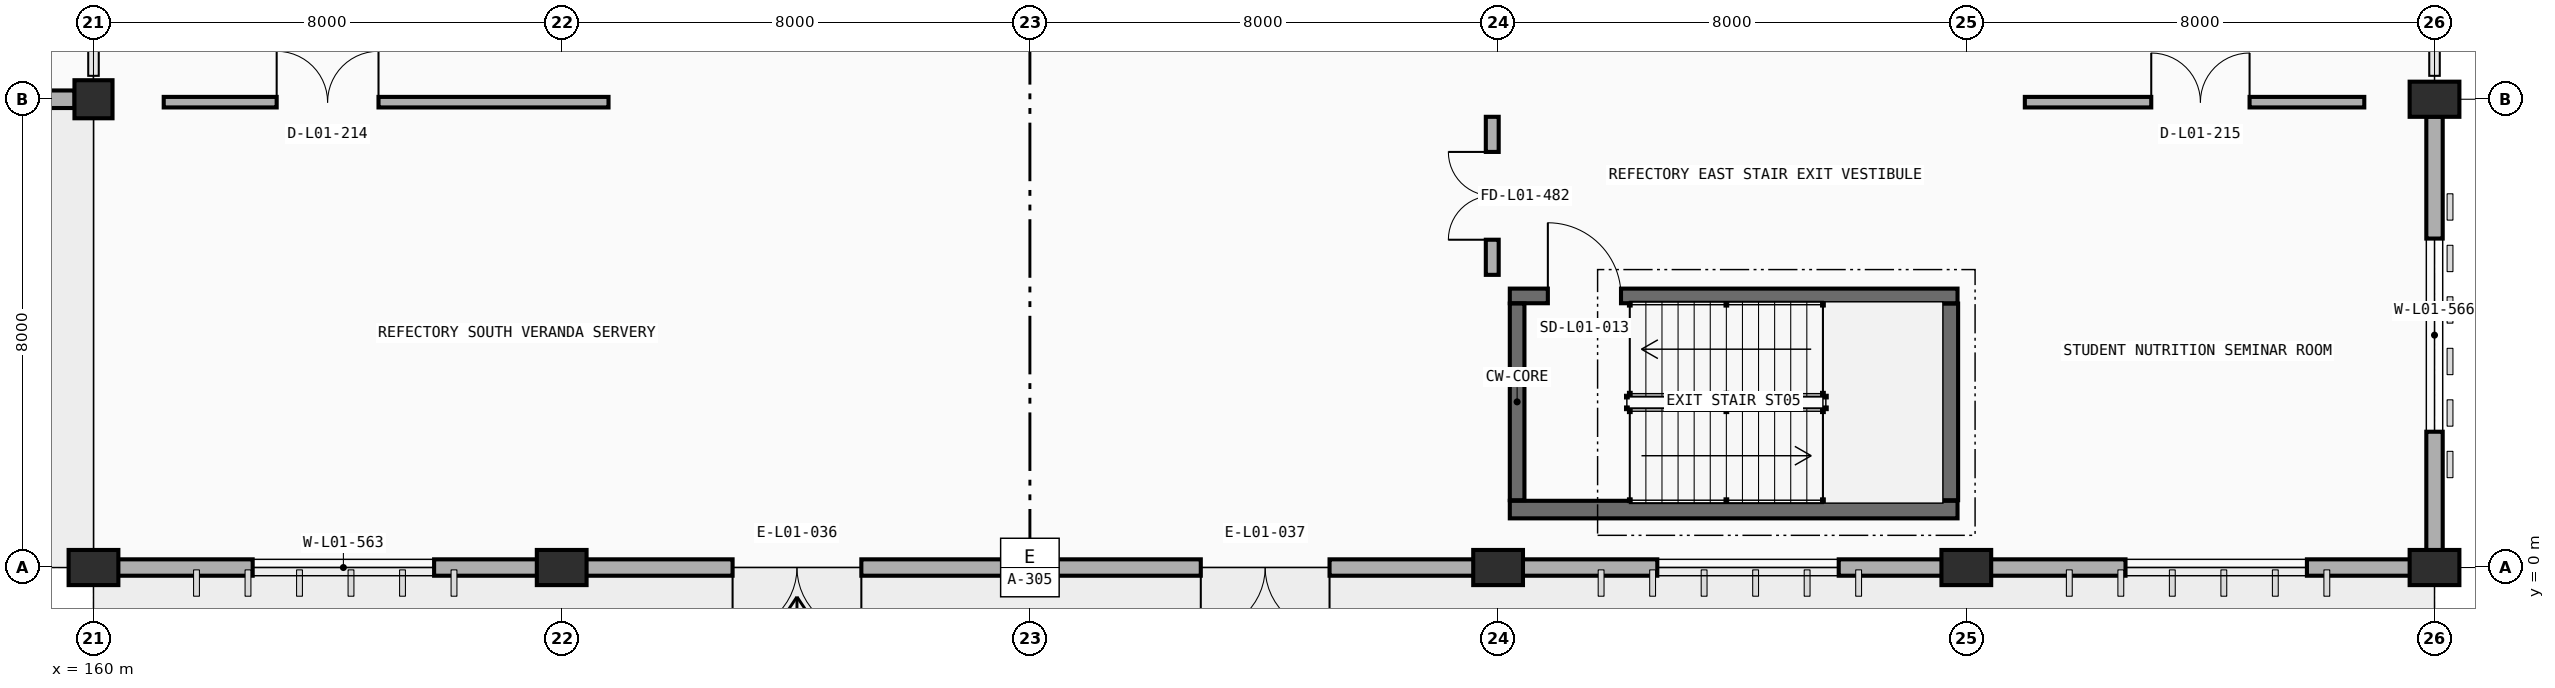
"""IFC4 building model, lengths in metres.
Left out: names, types, materials, properties, quantities, classifications, styles, units other than length and angle.
Written with IfcOpenShell. Run it as: python <this file> out.ifc"""

import sys

from ifc_helpers import new_model, si_unit, direction, frame, frame_2d, origin, origin_2d, place, context, subcontext, project, spatial, rectangle, extrude, element, fill, save


model = new_model("IFC4")
c1 = context("Model", 3, precision=1e-05, world=origin(), true_north=direction((0.0, 1.0)))
c2 = subcontext(c1, "Body", "Model", "MODEL_VIEW")
j1 = project(units=[si_unit("LENGTHUNIT", "METRE"), si_unit("PLANEANGLEUNIT", "RADIAN")], contexts=[c1])
p1 = place(None, origin())
s1 = spatial("IfcSite", under=j1, at=p1, CompositionType="ELEMENT")
p2 = place(p1, origin())
s2 = spatial("IfcBuilding", under=s1, at=p2, CompositionType="ELEMENT")
p3 = place(p2, origin())
s3 = spatial("IfcBuildingStorey", under=s2, at=p3, CompositionType="ELEMENT", Elevation=0.0)
for number, where, z_axis, x_axis in (
    (1, (160.0, 0.0, 0.0), (0.0, 0.0, 1.0), (0.0, 1.0, 0.0)),
    (2, (168.0, 0.0, 0.0), (0.0, 0.0, 1.0), (0.0, 1.0, 0.0)),
    (3, (176.0, 0.0, 0.0), (0.0, 0.0, 1.0), (0.0, 1.0, 0.0)),
    (4, (184.0, 0.0, 0.0), (0.0, 0.0, 1.0), (0.0, 1.0, 0.0)),
    (5, (192.0, 0.0, 0.0), (0.0, 0.0, 1.0), (0.0, 1.0, 0.0)),
    (6, (200.0, 0.0, 0.0), (0.0, 0.0, 1.0), (0.0, 1.0, 0.0)),
):
    element("IfcColumn", number, at=place(p3, frame(where, z_axis=z_axis, x_axis=x_axis)), inside=s3, PredefinedType="COLUMN", context=c2, shape_type="SweptSolid", body=[
        extrude(rectangle(XDim=0.6, YDim=0.85, at=origin_2d()), origin(), (0.0, 0.0, 1.0), 4.8),
    ])
p4 = place(p3, frame((160.0, 8.0, 0.0), z_axis=(0.0, 0.0, 1.0), x_axis=(1.0, 0.0, 0.0)))
e7 = element("IfcColumn", 7, at=p4, inside=s3, PredefinedType="COLUMN", context=c2, shape_type="SweptSolid", body=[
    extrude(rectangle(XDim=0.65, YDim=0.65, at=origin_2d()), origin(), (0.0, 0.0, 1.0), 4.8),
])
p5 = place(p3, frame((200.0, 8.0, 0.0), z_axis=(0.0, 0.0, 1.0), x_axis=(0.0, 1.0, 0.0)))
e8 = element("IfcColumn", 8, at=p5, inside=s3, PredefinedType="COLUMN", context=c2, shape_type="SweptSolid", body=[
    extrude(rectangle(XDim=0.6, YDim=0.85, at=origin_2d()), origin(), (0.0, 0.0, 1.0), 4.8),
])
p6 = place(p3, frame((159.678, 8.0, 0.0), z_axis=(0.0, 0.0, 1.0), x_axis=(-1.0, 0.0, 0.0)))
e9 = element("IfcWall", 9, at=p6, inside=s3, PredefinedType="STANDARD", context=c2, shape_type="SweptSolid", body=[
    extrude(rectangle(XDim=7.331, YDim=0.3, at=frame_2d((3.666, 0.0))), origin(), (0.0, 0.0, 1.0), 3.91),
])
p7 = place(p6, frame((2.258, 0.0, 0.9)))
e10 = element("IfcOpeningElement", 10, at=p7, cuts=e9, PredefinedType="OPENING", context=c2, shape_type="SweptSolid", body=[
    extrude(rectangle(XDim=1.45, YDim=1.25, at=frame_2d((0.725, 0.625))), frame((0.0, 0.16, 0.0), z_axis=(0.0, -1.0, 0.0), x_axis=(1.0, 0.0, 0.0)), (0.0, 0.0, 1.0), 0.32),
])
p8 = place(p3, frame((167.62, 0.0, 0.0), z_axis=(0.0, 0.0, 1.0), x_axis=(-1.0, 0.0, 0.0)))
e11 = element("IfcWall", 11, at=p8, inside=s3, PredefinedType="STANDARD", context=c2, shape_type="SweptSolid", body=[
    extrude(rectangle(XDim=7.24, YDim=0.28, at=frame_2d((3.62, 0.0))), origin(), (0.0, 0.0, 1.0), 3.89),
])
p9 = place(p8, frame((1.8, 0.0, 0.9)))
e12 = element("IfcOpeningElement", 12, at=p9, cuts=e11, PredefinedType="OPENING", context=c2, shape_type="SweptSolid", body=[
    extrude(rectangle(XDim=3.1, YDim=1.6, at=frame_2d((1.55, 0.8))), frame((0.0, 0.15, 0.0), z_axis=(0.0, -1.0, 0.0), x_axis=(1.0, 0.0, 0.0)), (0.0, 0.0, 1.0), 0.3),
])
p10 = place(p3, frame((175.62, 0.0, 0.0), z_axis=(0.0, 0.0, 1.0), x_axis=(-1.0, 0.0, 0.0)))
e13 = element("IfcWall", 13, at=p10, inside=s3, PredefinedType="STANDARD", context=c2, shape_type="SweptSolid", body=[
    extrude(rectangle(XDim=7.24, YDim=0.28, at=frame_2d((3.62, 0.0))), origin(), (0.0, 0.0, 1.0), 3.89),
])
p11 = place(p10, frame((2.5, 0.0, 0.0)))
e14 = element("IfcOpeningElement", 14, at=p11, cuts=e13, PredefinedType="OPENING", context=c2, shape_type="SweptSolid", body=[
    extrude(rectangle(XDim=2.2, YDim=2.4, at=frame_2d((1.1, 1.2))), frame((0.0, 0.15, 0.0), z_axis=(0.0, -1.0, 0.0), x_axis=(1.0, 0.0, 0.0)), (0.0, 0.0, 1.0), 0.3),
])
p12 = place(p3, frame((183.62, 0.0, 0.0), z_axis=(0.0, 0.0, 1.0), x_axis=(-1.0, 0.0, 0.0)))
e15 = element("IfcWall", 15, at=p12, inside=s3, PredefinedType="STANDARD", context=c2, shape_type="SweptSolid", body=[
    extrude(rectangle(XDim=7.24, YDim=0.28, at=frame_2d((3.62, 0.0))), origin(), (0.0, 0.0, 1.0), 3.89),
])
p13 = place(p12, frame((2.5, 0.0, 0.0)))
e16 = element("IfcOpeningElement", 16, at=p13, cuts=e15, PredefinedType="OPENING", context=c2, shape_type="SweptSolid", body=[
    extrude(rectangle(XDim=2.2, YDim=2.4, at=frame_2d((1.1, 1.2))), frame((0.0, 0.15, 0.0), z_axis=(0.0, -1.0, 0.0), x_axis=(1.0, 0.0, 0.0)), (0.0, 0.0, 1.0), 0.3),
])
p14 = place(p3, frame((191.62, 0.0, 0.0), z_axis=(0.0, 0.0, 1.0), x_axis=(-1.0, 0.0, 0.0)))
e17 = element("IfcWall", 17, at=p14, inside=s3, PredefinedType="STANDARD", context=c2, shape_type="SweptSolid", body=[
    extrude(rectangle(XDim=7.24, YDim=0.28, at=frame_2d((3.62, 0.0))), origin(), (0.0, 0.0, 1.0), 3.89),
])
p15 = place(p14, frame((1.8, 0.0, 0.9)))
e18 = element("IfcOpeningElement", 18, at=p15, cuts=e17, PredefinedType="OPENING", context=c2, shape_type="SweptSolid", body=[
    extrude(rectangle(XDim=3.1, YDim=1.6, at=frame_2d((1.55, 0.8))), frame((0.0, 0.15, 0.0), z_axis=(0.0, -1.0, 0.0), x_axis=(1.0, 0.0, 0.0)), (0.0, 0.0, 1.0), 0.3),
])
p16 = place(p3, frame((199.62, 0.0, 0.0), z_axis=(0.0, 0.0, 1.0), x_axis=(-1.0, 0.0, 0.0)))
e19 = element("IfcWall", 19, at=p16, inside=s3, PredefinedType="STANDARD", context=c2, shape_type="SweptSolid", body=[
    extrude(rectangle(XDim=7.24, YDim=0.28, at=frame_2d((3.62, 0.0))), origin(), (0.0, 0.0, 1.0), 3.89),
])
p17 = place(p16, frame((1.8, 0.0, 0.9)))
e20 = element("IfcOpeningElement", 20, at=p17, cuts=e19, PredefinedType="OPENING", context=c2, shape_type="SweptSolid", body=[
    extrude(rectangle(XDim=3.1, YDim=1.6, at=frame_2d((1.55, 0.8))), frame((0.0, 0.15, 0.0), z_axis=(0.0, -1.0, 0.0), x_axis=(1.0, 0.0, 0.0)), (0.0, 0.0, 1.0), 0.3),
])
p18 = place(p3, frame((200.0, 7.703, 0.0), z_axis=(0.0, 0.0, 1.0), x_axis=(0.0, -1.0, 0.0)))
e21 = element("IfcWall", 21, at=p18, inside=s3, PredefinedType="STANDARD", context=c2, shape_type="SweptSolid", body=[
    extrude(rectangle(XDim=7.406, YDim=0.28, at=frame_2d((3.703, 0.0))), origin(), (0.0, 0.0, 1.0), 3.59),
])
p19 = place(p18, frame((2.083, 0.0, 0.95)))
e22 = element("IfcOpeningElement", 22, at=p19, cuts=e21, PredefinedType="OPENING", context=c2, shape_type="SweptSolid", body=[
    extrude(rectangle(XDim=3.3, YDim=1.75, at=frame_2d((1.65, 0.875))), frame((0.0, 0.15, 0.0), z_axis=(0.0, -1.0, 0.0), x_axis=(1.0, 0.0, 0.0)), (0.0, 0.0, 1.0), 0.3),
])
p20 = place(p3, frame((184.2, 0.99, 0.0), z_axis=(0.0, 0.0, 1.0), x_axis=(1.0, 0.0, 0.0)))
e23 = element("IfcWall", 23, at=p20, inside=s3, PredefinedType="SHEAR", context=c2, shape_type="SweptSolid", body=[
    extrude(rectangle(XDim=7.65, YDim=0.3, at=frame_2d((3.825, 0.0))), origin(), (0.0, 0.0, 1.0), 4.8),
])
p21 = place(p3, frame((191.71, 1.15, 0.0), z_axis=(0.0, 0.0, 1.0), x_axis=(0.0, 1.0, 0.0)))
e24 = element("IfcWall", 24, at=p21, inside=s3, PredefinedType="SHEAR", context=c2, shape_type="SweptSolid", body=[
    extrude(rectangle(XDim=3.36, YDim=0.3, at=frame_2d((1.68, 0.0))), origin(), (0.0, 0.0, 1.0), 4.8),
])
p22 = place(p3, frame((184.2, 4.64, 0.0), z_axis=(0.0, 0.0, 1.0), x_axis=(1.0, 0.0, 0.0)))
e25 = element("IfcWall", 25, at=p22, inside=s3, PredefinedType="SOLIDWALL", context=c2, shape_type="SweptSolid", body=[
    extrude(rectangle(XDim=7.65, YDim=0.25, at=frame_2d((3.825, 0.0))), origin(), (0.0, 0.0, 1.0), 4.8),
])
p23 = place(p22, frame((0.65, 0.0, 0.0)))
e26 = element("IfcOpeningElement", 26, at=p23, cuts=e25, PredefinedType="OPENING", context=c2, shape_type="SweptSolid", body=[
    extrude(rectangle(XDim=1.25, YDim=2.15, at=frame_2d((0.625, 1.075))), frame((0.0, 0.135, 0.0), z_axis=(0.0, -1.0, 0.0), x_axis=(1.0, 0.0, 0.0)), (0.0, 0.0, 1.0), 0.27),
])
p24 = place(p3, frame((184.325, 1.15, 0.0), z_axis=(0.0, 0.0, 1.0), x_axis=(0.0, 1.0, 0.0)))
e27 = element("IfcWall", 27, at=p24, inside=s3, PredefinedType="SOLIDWALL", context=c2, shape_type="SweptSolid", body=[
    extrude(rectangle(XDim=3.36, YDim=0.25, at=frame_2d((1.68, 0.0))), origin(), (0.0, 0.0, 1.0), 4.8),
])
p25 = place(p3, frame((161.2, 7.95, 0.0), z_axis=(0.0, 0.0, 1.0), x_axis=(1.0, 0.0, 0.0)))
e28 = element("IfcWall", 28, at=p25, inside=s3, PredefinedType="PARTITIONING", context=c2, shape_type="SweptSolid", body=[
    extrude(rectangle(XDim=7.6, YDim=0.18, at=frame_2d((3.8, 0.0))), origin(), (0.0, 0.0, 1.0), 3.9),
])
p26 = place(p25, frame((1.93, 0.0, 0.0)))
e29 = element("IfcOpeningElement", 29, at=p26, cuts=e28, PredefinedType="OPENING", context=c2, shape_type="SweptSolid", body=[
    extrude(rectangle(XDim=1.74, YDim=2.22, at=frame_2d((0.87, 1.11))), frame((0.0, 0.1, 0.0), z_axis=(0.0, -1.0, 0.0), x_axis=(1.0, 0.0, 0.0)), (0.0, 0.0, 1.0), 0.2),
])
p27 = place(p3, frame((193.0, 7.95, 0.0), z_axis=(0.0, 0.0, 1.0), x_axis=(1.0, 0.0, 0.0)))
e30 = element("IfcWall", 30, at=p27, inside=s3, PredefinedType="PARTITIONING", context=c2, shape_type="SweptSolid", body=[
    extrude(rectangle(XDim=5.8, YDim=0.18, at=frame_2d((2.9, 0.0))), origin(), (0.0, 0.0, 1.0), 3.9),
])
p28 = place(p27, frame((2.16, 0.0, 0.0)))
e31 = element("IfcOpeningElement", 31, at=p28, cuts=e30, PredefinedType="OPENING", context=c2, shape_type="SweptSolid", body=[
    extrude(rectangle(XDim=1.68, YDim=2.25, at=frame_2d((0.84, 1.125))), frame((0.0, 0.1, 0.0), z_axis=(0.0, -1.0, 0.0), x_axis=(1.0, 0.0, 0.0)), (0.0, 0.0, 1.0), 0.2),
])
p29 = place(p3, frame((183.9, 5.0, 0.0), z_axis=(0.0, 0.0, 1.0), x_axis=(0.0, 1.0, 0.0)))
e32 = element("IfcWall", 32, at=p29, inside=s3, PredefinedType="PARTITIONING", context=c2, shape_type="SweptSolid", body=[
    extrude(rectangle(XDim=2.7, YDim=0.22, at=frame_2d((1.35, 0.0))), origin(), (0.0, 0.0, 1.0), 3.812),
])
p30 = place(p29, frame((0.6, 0.0, 0.0)))
e33 = element("IfcOpeningElement", 33, at=p30, cuts=e32, PredefinedType="OPENING", context=c2, shape_type="SweptSolid", body=[
    extrude(rectangle(XDim=1.5, YDim=2.2, at=frame_2d((0.75, 1.1))), frame((0.0, 0.12, 0.0), z_axis=(0.0, -1.0, 0.0), x_axis=(1.0, 0.0, 0.0)), (0.0, 0.0, 1.0), 0.24),
])
p31 = place(p9, origin())
e34 = element("IfcWindow", 34, at=p31, inside=s3, PartitioningType="DOUBLE_PANEL_VERTICAL", PredefinedType="WINDOW", context=c2, shape_type="SweptSolid", body=[
    extrude(rectangle(XDim=3.1, YDim=1.6, at=frame_2d((1.55, 0.8))), frame((0.0, 0.03, 0.0), z_axis=(0.0, -1.0, 0.0), x_axis=(1.0, 0.0, 0.0)), (0.0, 0.0, 1.0), 0.06),
])
fill(e12, e34)
p32 = place(p11, origin())
e35 = element("IfcDoor", 35, at=p32, inside=s3, OperationType="DOUBLE_DOOR_SINGLE_SWING", PredefinedType="DOOR", context=c2, shape_type="SweptSolid", body=[
    extrude(rectangle(XDim=2.2, YDim=2.4, at=frame_2d((1.1, 1.2))), frame((0.0, 0.025, 0.0), z_axis=(0.0, -1.0, 0.0), x_axis=(1.0, 0.0, 0.0)), (0.0, 0.0, 1.0), 0.05),
])
fill(e14, e35)
p33 = place(p13, origin())
e36 = element("IfcDoor", 36, at=p33, inside=s3, OperationType="DOUBLE_DOOR_SINGLE_SWING", PredefinedType="DOOR", context=c2, shape_type="SweptSolid", body=[
    extrude(rectangle(XDim=2.2, YDim=2.4, at=frame_2d((1.1, 1.2))), frame((0.0, 0.025, 0.0), z_axis=(0.0, -1.0, 0.0), x_axis=(1.0, 0.0, 0.0)), (0.0, 0.0, 1.0), 0.05),
])
fill(e16, e36)
p34 = place(p15, origin())
e37 = element("IfcWindow", 37, at=p34, inside=s3, PartitioningType="DOUBLE_PANEL_VERTICAL", PredefinedType="WINDOW", context=c2, shape_type="SweptSolid", body=[
    extrude(rectangle(XDim=3.1, YDim=1.6, at=frame_2d((1.55, 0.8))), frame((0.0, 0.03, 0.0), z_axis=(0.0, -1.0, 0.0), x_axis=(1.0, 0.0, 0.0)), (0.0, 0.0, 1.0), 0.06),
])
fill(e18, e37)
p35 = place(p17, origin())
e38 = element("IfcWindow", 38, at=p35, inside=s3, PartitioningType="DOUBLE_PANEL_VERTICAL", PredefinedType="WINDOW", context=c2, shape_type="SweptSolid", body=[
    extrude(rectangle(XDim=3.1, YDim=1.6, at=frame_2d((1.55, 0.8))), frame((0.0, 0.03, 0.0), z_axis=(0.0, -1.0, 0.0), x_axis=(1.0, 0.0, 0.0)), (0.0, 0.0, 1.0), 0.06),
])
fill(e20, e38)
p36 = place(p19, origin())
e39 = element("IfcWindow", 39, at=p36, inside=s3, PartitioningType="DOUBLE_PANEL_VERTICAL", PredefinedType="WINDOW", context=c2, shape_type="SweptSolid", body=[
    extrude(rectangle(XDim=3.3, YDim=1.75, at=frame_2d((1.65, 0.875))), frame((0.0, 0.03, 0.0), z_axis=(0.0, -1.0, 0.0), x_axis=(1.0, 0.0, 0.0)), (0.0, 0.0, 1.0), 0.06),
])
fill(e22, e39)
p37 = place(p23, origin())
e40 = element("IfcDoor", 40, at=p37, inside=s3, OperationType="SINGLE_SWING_LEFT", PredefinedType="DOOR", context=c2, shape_type="SweptSolid", body=[
    extrude(rectangle(XDim=1.25, YDim=2.15, at=frame_2d((0.625, 1.075))), frame((0.0, 0.025, 0.0), z_axis=(0.0, -1.0, 0.0), x_axis=(1.0, 0.0, 0.0)), (0.0, 0.0, 1.0), 0.05),
])
fill(e26, e40)
p38 = place(p26, origin())
e41 = element("IfcDoor", 41, at=p38, inside=s3, OperationType="DOUBLE_DOOR_SINGLE_SWING", PredefinedType="DOOR", context=c2, shape_type="SweptSolid", body=[
    extrude(rectangle(XDim=1.74, YDim=2.22, at=frame_2d((0.87, 1.11))), frame((0.0, 0.025, 0.0), z_axis=(0.0, -1.0, 0.0), x_axis=(1.0, 0.0, 0.0)), (0.0, 0.0, 1.0), 0.05),
])
fill(e29, e41)
p39 = place(p28, origin())
e42 = element("IfcDoor", 42, at=p39, inside=s3, OperationType="DOUBLE_DOOR_SINGLE_SWING", PredefinedType="DOOR", context=c2, shape_type="SweptSolid", body=[
    extrude(rectangle(XDim=1.68, YDim=2.25, at=frame_2d((0.84, 1.125))), frame((0.0, 0.025, 0.0), z_axis=(0.0, -1.0, 0.0), x_axis=(1.0, 0.0, 0.0)), (0.0, 0.0, 1.0), 0.05),
])
fill(e31, e42)
p40 = place(p30, origin())
e43 = element("IfcDoor", 43, at=p40, inside=s3, OperationType="DOUBLE_DOOR_SINGLE_SWING", PredefinedType="DOOR", context=c2, shape_type="SweptSolid", body=[
    extrude(rectangle(XDim=1.5, YDim=2.2, at=frame_2d((0.75, 1.1))), frame((0.0, 0.025, 0.0), z_axis=(0.0, -1.0, 0.0), x_axis=(1.0, 0.0, 0.0)), (0.0, 0.0, 1.0), 0.05),
])
fill(e33, e43)
save(model, sys.argv[1])
